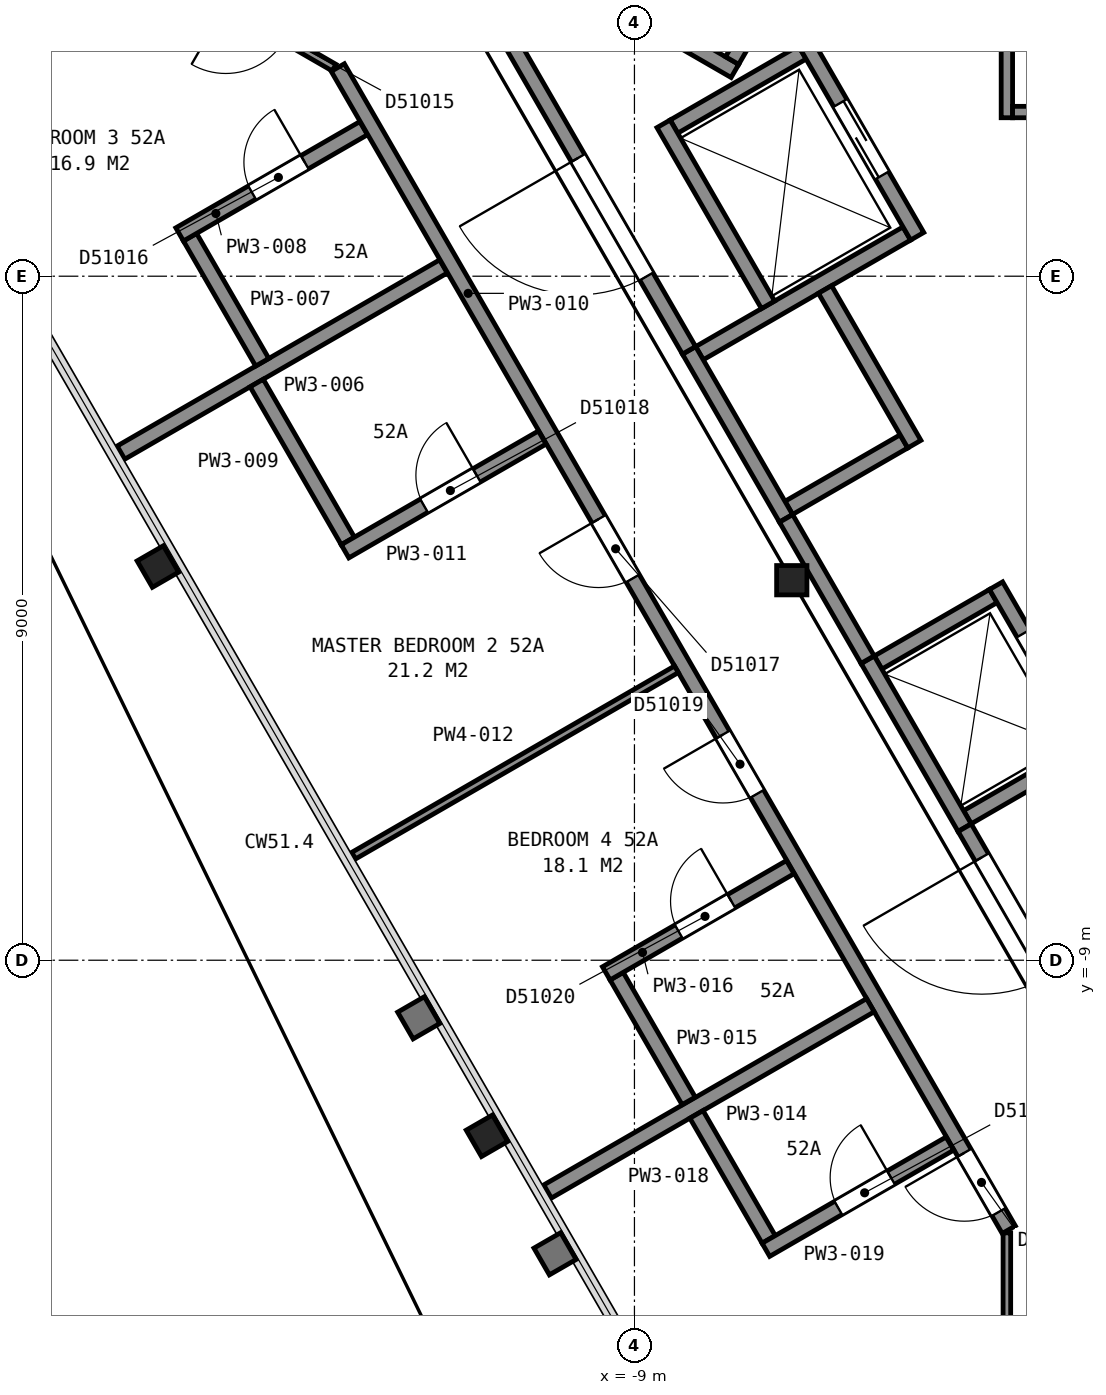
"""IFC4 building model, lengths in metres.
Left out: names, types, materials, properties, quantities, classifications, styles, units other than length and angle.
Written with IfcOpenShell. Run it as: python <this file> out.ifc"""

import sys

from ifc_helpers import new_model, si_unit, direction, frame, frame_2d, origin, origin_2d, place, context, subcontext, project, spatial, rectangle, i_section, extrude, element, fill, save


model = new_model("IFC4")
c1 = context("Model", 3, precision=1e-05, world=origin(), true_north=direction((0.0, 1.0)))
c2 = subcontext(c1, "Body", "Model", "MODEL_VIEW")
j1 = project(units=[si_unit("LENGTHUNIT", "METRE"), si_unit("PLANEANGLEUNIT", "RADIAN")], contexts=[c1])
p1 = place(None, origin())
s1 = spatial("IfcSite", under=j1, at=p1, CompositionType="ELEMENT")
p2 = place(p1, origin())
s2 = spatial("IfcBuilding", under=s1, at=p2, CompositionType="ELEMENT")
p3 = place(p2, frame((0.0, 0.0, 210.1)))
s3 = spatial("IfcBuildingStorey", under=s2, at=p3, CompositionType="ELEMENT", Elevation=210.1)
for number, where, z_axis, x_axis in (
    (1, (-15.27, -3.82, 0.0), (0.0, 0.0, 1.0), (-0.5, 0.866, 0.0)),
    (2, (-10.94, -11.31, 0.0), (0.0, 0.0, 1.0), (-0.5, 0.866, 0.0)),
):
    element("IfcColumn", number, at=place(p3, frame(where, z_axis=z_axis, x_axis=x_axis)), inside=s3, PredefinedType="COLUMN", context=c2, shape_type="SweptSolid", body=[
        extrude(i_section(OverallWidth=0.401, OverallDepth=0.399, WebThickness=0.025, FlangeThickness=0.04, FilletRadius=0.015, at=origin_2d()), origin(), (0.0, 0.0, 1.0), 3.665),
    ])
p4 = place(p3, frame((-6.93, -4.0, 0.0), z_axis=(0.0, 0.0, 1.0), x_axis=(1.0, 0.0, 0.0)))
e3 = element("IfcColumn", 3, at=p4, inside=s3, PredefinedType="COLUMN", context=c2, shape_type="SweptSolid", body=[
    extrude(i_section(OverallWidth=0.399, OverallDepth=0.386, WebThickness=0.021, FlangeThickness=0.033, FilletRadius=0.015, at=origin_2d()), origin(), (0.0, 0.0, 1.0), 3.7),
])
p5 = place(p3, frame((-7.678, 2.701, 0.0), z_axis=(0.0, 0.0, 1.0), x_axis=(-0.866019993635, 0.500009370536, 0.0)))
e4 = element("IfcWall", 4, at=p5, inside=s3, PredefinedType="PARTITIONING", context=c2, shape_type="SweptSolid", body=[
    extrude(rectangle(XDim=9.6, YDim=0.2, at=frame_2d((4.8, 0.0))), origin(), (0.0, 0.0, 1.0), 3.45),
])
p6 = place(p3, frame((-6.315, 5.262, 0.0), z_axis=(0.0, 0.0, 1.0), x_axis=(-0.500049511043, -0.865996816683, 0.0)))
e5 = element("IfcWall", 5, at=p6, inside=s3, PredefinedType="PARTITIONING", context=c2, shape_type="SweptSolid", body=[
    extrude(rectangle(XDim=2.8, YDim=0.2, at=frame_2d((1.4, 0.0))), origin(), (0.0, 0.0, 1.0), 3.45),
])
for number, where, z_axis, x_axis in (
    (6, (-4.62, -7.118, 0.0), (0.0, 0.0, 1.0), (0.866, 0.5, 0.0)),
    (7, (-5.795, -5.083, 0.0), (0.0, 0.0, 1.0), (0.866, 0.5, 0.0)),
    (8, (-6.97, -3.048, 0.0), (0.0, 0.0, 1.0), (0.866, 0.5, 0.0)),
):
    element("IfcWall", number, at=place(p3, frame(where, z_axis=z_axis, x_axis=x_axis)), inside=s3, PredefinedType="PARTITIONING", context=c2, shape_type="SweptSolid", body=[
        extrude(rectangle(XDim=1.75, YDim=0.2, at=frame_2d((0.875, 0.0))), origin(), (0.0, 0.0, 1.0), 3.7),
    ])
p7 = place(p3, frame((-8.145, -1.013, 0.0), z_axis=(0.0, 0.0, 1.0), x_axis=(0.866016494683, 0.500015430699, 0.0)))
e9 = element("IfcWall", 9, at=p7, inside=s3, PredefinedType="PARTITIONING", context=c2, shape_type="SweptSolid", body=[
    extrude(rectangle(XDim=3.15, YDim=0.2, at=frame_2d((1.575, 0.0))), origin(), (0.0, 0.0, 1.0), 3.7),
])
p8 = place(p3, frame((-8.48, 1.969, 0.0), z_axis=(0.0, 0.0, 1.0), x_axis=(0.866000020948, 0.500043961785, 0.0)))
e10 = element("IfcWall", 10, at=p8, inside=s3, PredefinedType="PARTITIONING", context=c2, shape_type="SweptSolid", body=[
    extrude(rectangle(XDim=1.95, YDim=0.2, at=frame_2d((0.975, 0.0))), origin(), (0.0, 0.0, 1.0), 3.7),
])
p9 = place(p3, frame((-5.28, 0.525, 0.0), z_axis=(0.0, 0.0, 1.0), x_axis=(-0.500037662692, 0.866003658127, 0.0)))
e11 = element("IfcWall", 11, at=p9, inside=s3, PredefinedType="PARTITIONING", context=c2, shape_type="SweptSolid", body=[
    extrude(rectangle(XDim=2.95, YDim=0.2, at=frame_2d((1.475, 0.0))), origin(), (0.0, 0.0, 1.0), 3.7),
])
p10 = place(p9, frame((0.925, 0.0, 0.0)))
e12 = element("IfcOpeningElement", 12, at=p10, cuts=e11, PredefinedType="OPENING", context=c2, shape_type="SweptSolid", body=[
    extrude(rectangle(XDim=1.1, YDim=2.1, at=frame_2d((0.55, 1.05))), frame((0.0, 0.11, 0.0), z_axis=(0.0, -1.0, 0.0), x_axis=(1.0, 0.0, 0.0)), (0.0, 0.0, 1.0), 0.22),
])
p11 = place(p3, frame((-2.968, -6.28, 0.0), z_axis=(0.0, 0.0, 1.0), x_axis=(-0.499990435942, 0.866030925526, 0.0)))
e13 = element("IfcWall", 13, at=p11, inside=s3, PredefinedType="PARTITIONING", context=c2, shape_type="SweptSolid", body=[
    extrude(rectangle(XDim=2.55, YDim=0.2, at=frame_2d((1.275, 0.0))), origin(), (0.0, 0.0, 1.0), 3.7),
])
p12 = place(p11, frame((0.725, 0.0, 0.0)))
e14 = element("IfcOpeningElement", 14, at=p12, cuts=e13, PredefinedType="OPENING", context=c2, shape_type="SweptSolid", body=[
    extrude(rectangle(XDim=1.1, YDim=2.1, at=frame_2d((0.55, 1.05))), frame((0.0, 0.11, 0.0), z_axis=(0.0, -1.0, 0.0), x_axis=(1.0, 0.0, 0.0)), (0.0, 0.0, 1.0), 0.22),
])
p13 = place(p3, frame((-5.318, -2.21, 0.0), z_axis=(0.0, 0.0, 1.0), x_axis=(-0.499938297808, 0.866061024631, 0.0)))
e15 = element("IfcWall", 15, at=p13, inside=s3, PredefinedType="PARTITIONING", context=c2, shape_type="SweptSolid", body=[
    extrude(rectangle(XDim=2.35, YDim=0.2, at=frame_2d((1.175, 0.0))), origin(), (0.0, 0.0, 1.0), 3.7),
])
p14 = place(p3, frame((-7.242, -0.376, 0.0), z_axis=(0.0, 0.0, 1.0), x_axis=(-0.499996545922, 0.866027397988, 0.0)))
e16 = element("IfcWall", 16, at=p14, inside=s3, PredefinedType="PARTITIONING", context=c2, shape_type="SweptSolid", body=[
    extrude(rectangle(XDim=2.75, YDim=0.2, at=frame_2d((1.375, 0.0))), origin(), (0.0, 0.0, 1.0), 3.7),
])
for number, where, z_axis, x_axis in (
    (17, (-4.656, -7.255, 0.0), (0.0, 0.0, 1.0), (-0.5, 0.866, 0.0)),
    (18, (-7.006, -3.185, 0.0), (0.0, 0.0, 1.0), (-0.5, 0.866, 0.0)),
):
    element("IfcWall", number, at=place(p3, frame(where, z_axis=z_axis, x_axis=x_axis)), inside=s3, PredefinedType="PARTITIONING", context=c2, shape_type="SweptSolid", body=[
        extrude(rectangle(XDim=2.55, YDim=0.2, at=frame_2d((1.275, 0.0))), origin(), (0.0, 0.0, 1.0), 3.7),
    ])
p15 = place(p3, frame((-11.591, 4.755, 0.0), z_axis=(0.0, 0.0, 1.0), x_axis=(0.500043977787, -0.866000011708, 0.0)))
e19 = element("IfcWall", 19, at=p15, inside=s3, PredefinedType="PARTITIONING", context=c2, shape_type="SweptSolid", body=[
    extrude(rectangle(XDim=6.617, YDim=0.2, at=frame_2d((3.308, 0.0))), origin(), (0.0, 0.0, 1.0), 3.45),
])
p16 = place(p15, frame((3.695, 0.0, 0.0)))
e20 = element("IfcOpeningElement", 20, at=p16, cuts=e19, PredefinedType="OPENING", context=c2, shape_type="SweptSolid", body=[
    extrude(rectangle(XDim=1.8, YDim=2.1, at=frame_2d((0.9, 1.05))), frame((0.0, 0.11, 0.0), z_axis=(0.0, -1.0, 0.0), x_axis=(1.0, 0.0, 0.0)), (0.0, 0.0, 1.0), 0.22),
])
p17 = place(p3, frame((-7.005, -3.187, 0.0), z_axis=(0.0, 0.0, 1.0), x_axis=(0.499689606989, -0.866204535123, 0.0)))
e21 = element("IfcWall", 21, at=p17, inside=s3, PredefinedType="PARTITIONING", context=c2, shape_type="SweptSolid", body=[
    extrude(rectangle(XDim=2.145, YDim=0.2, at=frame_2d((1.072, 0.0))), origin(), (0.0, 0.0, 1.0), 3.45),
])
p18 = place(p3, frame((-4.655, -7.257, 0.0), z_axis=(0.0, 0.0, 1.0), x_axis=(0.499966124405, -0.866044960985, 0.0)))
e22 = element("IfcWall", 22, at=p18, inside=s3, PredefinedType="PARTITIONING", context=c2, shape_type="SweptSolid", body=[
    extrude(rectangle(XDim=5.956, YDim=0.2, at=frame_2d((2.978, 0.0))), origin(), (0.0, 0.0, 1.0), 3.45),
])
p19 = place(p18, frame((0.45, 0.0, 0.0)))
e23 = element("IfcOpeningElement", 23, at=p19, cuts=e22, PredefinedType="OPENING", context=c2, shape_type="SweptSolid", body=[
    extrude(rectangle(XDim=1.8, YDim=2.1, at=frame_2d((0.9, 1.05))), frame((0.0, 0.11, 0.0), z_axis=(0.0, -1.0, 0.0), x_axis=(1.0, 0.0, 0.0)), (0.0, 0.0, 1.0), 0.22),
])
p20 = place(p3, frame((-4.1, 2.085, 0.0), z_axis=(0.0, 0.0, 1.0), x_axis=(0.0, 1.0, 0.0)))
e24 = element("IfcWall", 24, at=p20, inside=s3, PredefinedType="PARTITIONING", context=c2, shape_type="SweptSolid", body=[
    extrude(rectangle(XDim=3.523, YDim=0.15, at=frame_2d((1.761, 0.0))), origin(), (0.0, 0.0, 1.0), 3.45),
])
p21 = place(p3, frame((-4.025, 2.16, 0.0), z_axis=(0.0, 0.0, 1.0), x_axis=(1.0, 0.0, 0.0)))
e25 = element("IfcWall", 25, at=p21, inside=s3, PredefinedType="PARTITIONING", context=c2, shape_type="SweptSolid", body=[
    extrude(rectangle(XDim=1.238, YDim=0.15, at=frame_2d((0.619, 0.0))), origin(), (0.0, 0.0, 1.0), 3.45),
])
p22 = place(p3, frame((-12.952, 2.744, 0.0), z_axis=(0.0, 0.0, 1.0), x_axis=(-0.86608949446, 0.499888975259, 0.0)))
e26 = element("IfcWall", 26, at=p22, inside=s3, PredefinedType="PARTITIONING", context=c2, shape_type="SweptSolid", body=[
    extrude(rectangle(XDim=8.165, YDim=0.1, at=frame_2d((4.083, 0.0))), origin(), (0.0, 0.0, 1.0), 2.713),
])
p23 = place(p22, frame((4.65, 0.0, 0.0)))
e27 = element("IfcOpeningElement", 27, at=p23, cuts=e26, PredefinedType="OPENING", context=c2, shape_type="SweptSolid", body=[
    extrude(rectangle(XDim=0.9, YDim=2.1, at=frame_2d((0.45, 1.05))), frame((0.0, 0.06, 0.0), z_axis=(0.0, -1.0, 0.0), x_axis=(1.0, 0.0, 0.0)), (0.0, 0.0, 1.0), 0.12),
])
p24 = place(p22, frame((0.746, 0.0, 0.0)))
e28 = element("IfcOpeningElement", 28, at=p24, cuts=e26, PredefinedType="OPENING", context=c2, shape_type="SweptSolid", body=[
    extrude(rectangle(XDim=0.9, YDim=2.1, at=frame_2d((0.45, 1.05))), frame((0.0, 0.06, 0.0), z_axis=(0.0, -1.0, 0.0), x_axis=(1.0, 0.0, 0.0)), (0.0, 0.0, 1.0), 0.12),
])
p25 = place(p3, frame((-18.308, 2.099, 0.0), z_axis=(0.0, 0.0, 1.0), x_axis=(0.866054218355, 0.499950088379, 0.0)))
e29 = element("IfcWall", 29, at=p25, inside=s3, PredefinedType="PARTITIONING", context=c2, shape_type="SweptSolid", body=[
    extrude(rectangle(XDim=3.652, YDim=0.1, at=frame_2d((1.826, 0.0))), origin(), (0.0, 0.0, 1.0), 2.713),
])
p26 = place(p3, frame((-15.756, -2.321, 0.0), z_axis=(0.0, 0.0, 1.0), x_axis=(0.866042025588, 0.499971209087, 0.0)))
e30 = element("IfcWall", 30, at=p26, inside=s3, PredefinedType="PARTITIONING", context=c2, shape_type="SweptSolid", body=[
    extrude(rectangle(XDim=4.899, YDim=0.2, at=frame_2d((2.45, 0.0))), origin(), (0.0, 0.0, 1.0), 2.713),
])
p27 = place(p3, frame((-14.847, 0.513, 0.0), z_axis=(0.0, 0.0, 1.0), x_axis=(0.499911523785, -0.866076479525, 0.0)))
e31 = element("IfcWall", 31, at=p27, inside=s3, PredefinedType="PARTITIONING", context=c2, shape_type="SweptSolid", body=[
    extrude(rectangle(XDim=1.9, YDim=0.2, at=frame_2d((0.95, 0.0))), origin(), (0.0, 0.0, 1.0), 2.713),
])
p28 = place(p3, frame((-12.563, 1.948, 0.0), z_axis=(0.0, 0.0, 1.0), x_axis=(-0.866041588165, -0.499971966783, 0.0)))
e32 = element("IfcWall", 32, at=p28, inside=s3, PredefinedType="PARTITIONING", context=c2, shape_type="SweptSolid", body=[
    extrude(rectangle(XDim=2.795, YDim=0.2, at=frame_2d((1.397, 0.0))), origin(), (0.0, 0.0, 1.0), 2.713),
])
p29 = place(p28, frame((0.895, 0.0, 0.0)))
e33 = element("IfcOpeningElement", 33, at=p29, cuts=e32, PredefinedType="OPENING", context=c2, shape_type="SweptSolid", body=[
    extrude(rectangle(XDim=0.8, YDim=2.1, at=frame_2d((0.4, 1.05))), frame((0.0, 0.11, 0.0), z_axis=(0.0, -1.0, 0.0), x_axis=(1.0, 0.0, 0.0)), (0.0, 0.0, 1.0), 0.22),
])
p30 = place(p3, frame((-13.97, -1.406, 0.0), z_axis=(0.0, 0.0, 1.0), x_axis=(0.499784123135, -0.866150004481, 0.0)))
e34 = element("IfcWall", 34, at=p30, inside=s3, PredefinedType="PARTITIONING", context=c2, shape_type="SweptSolid", body=[
    extrude(rectangle(XDim=2.399, YDim=0.2, at=frame_2d((1.199, 0.0))), origin(), (0.0, 0.0, 1.0), 2.713),
])
p31 = place(p3, frame((-4.075, -12.545, 0.0), z_axis=(0.0, 0.0, 1.0), x_axis=(-0.499999743747, 0.866025551732, 0.0)))
e35 = element("IfcWall", 35, at=p31, inside=s3, PredefinedType="PARTITIONING", context=c2, shape_type="SweptSolid", body=[
    extrude(rectangle(XDim=17.656, YDim=0.2, at=frame_2d((8.828, 0.0))), origin(), (0.0, 0.0, 1.0), 2.713),
])
p32 = place(p31, frame((9.895, 0.0, 0.0)))
e36 = element("IfcOpeningElement", 36, at=p32, cuts=e35, PredefinedType="OPENING", context=c2, shape_type="SweptSolid", body=[
    extrude(rectangle(XDim=0.9, YDim=2.1, at=frame_2d((0.45, 1.05))), frame((0.0, 0.11, 0.0), z_axis=(0.0, -1.0, 0.0), x_axis=(1.0, 0.0, 0.0)), (0.0, 0.0, 1.0), 0.22),
])
p33 = place(p31, frame((6.622, 0.0, 0.0)))
e37 = element("IfcOpeningElement", 37, at=p33, cuts=e35, PredefinedType="OPENING", context=c2, shape_type="SweptSolid", body=[
    extrude(rectangle(XDim=0.9, YDim=2.1, at=frame_2d((0.45, 1.05))), frame((0.0, 0.11, 0.0), z_axis=(0.0, -1.0, 0.0), x_axis=(1.0, 0.0, 0.0)), (0.0, 0.0, 1.0), 0.22),
])
p34 = place(p31, frame((0.268, 0.0, 0.0)))
e38 = element("IfcOpeningElement", 38, at=p34, cuts=e35, PredefinedType="OPENING", context=c2, shape_type="SweptSolid", body=[
    extrude(rectangle(XDim=0.9, YDim=2.1, at=frame_2d((0.45, 1.05))), frame((0.0, 0.11, 0.0), z_axis=(0.0, -1.0, 0.0), x_axis=(1.0, 0.0, 0.0)), (0.0, 0.0, 1.0), 0.22),
])
p35 = place(p3, frame((-12.808, -3.62, 0.0), z_axis=(0.0, 0.0, 1.0), x_axis=(0.866134024916, 0.499811815469, 0.0)))
e39 = element("IfcWall", 39, at=p35, inside=s3, PredefinedType="PARTITIONING", context=c2, shape_type="SweptSolid", body=[
    extrude(rectangle(XDim=2.996, YDim=0.2, at=frame_2d((1.498, 0.0))), origin(), (0.0, 0.0, 1.0), 2.713),
])
p36 = place(p35, frame((1.2, 0.0, 0.0)))
e40 = element("IfcOpeningElement", 40, at=p36, cuts=e39, PredefinedType="OPENING", context=c2, shape_type="SweptSolid", body=[
    extrude(rectangle(XDim=0.8, YDim=2.1, at=frame_2d((0.4, 1.05))), frame((0.0, 0.11, 0.0), z_axis=(0.0, -1.0, 0.0), x_axis=(1.0, 0.0, 0.0)), (0.0, 0.0, 1.0), 0.22),
])
p37 = place(p3, frame((-12.694, -7.624, 0.0), z_axis=(0.0, 0.0, 1.0), x_axis=(0.865991567799, 0.500058601068, 0.0)))
e41 = element("IfcWall", 41, at=p37, inside=s3, PredefinedType="PARTITIONING", context=c2, shape_type="SweptSolid", body=[
    extrude(rectangle(XDim=4.904, YDim=0.1, at=frame_2d((2.452, 0.0))), origin(), (0.0, 0.0, 1.0), 2.713),
])
p38 = place(p3, frame((-10.143, -12.043, 0.0), z_axis=(0.0, 0.0, 1.0), x_axis=(0.866136679459, 0.49980721533, 0.0)))
e42 = element("IfcWall", 42, at=p38, inside=s3, PredefinedType="PARTITIONING", context=c2, shape_type="SweptSolid", body=[
    extrude(rectangle(XDim=4.904, YDim=0.2, at=frame_2d((2.452, 0.0))), origin(), (0.0, 0.0, 1.0), 2.713),
])
p39 = place(p3, frame((-9.234, -9.21, 0.0), z_axis=(0.0, 0.0, 1.0), x_axis=(0.499949193323, -0.866054735046, 0.0)))
e43 = element("IfcWall", 43, at=p39, inside=s3, PredefinedType="PARTITIONING", context=c2, shape_type="SweptSolid", body=[
    extrude(rectangle(XDim=1.895, YDim=0.2, at=frame_2d((0.948, 0.0))), origin(), (0.0, 0.0, 1.0), 2.713),
])
p40 = place(p3, frame((-6.95, -7.775, 0.0), z_axis=(0.0, 0.0, 1.0), x_axis=(-0.866003766563, -0.500037474894, 0.0)))
e44 = element("IfcWall", 44, at=p40, inside=s3, PredefinedType="PARTITIONING", context=c2, shape_type="SweptSolid", body=[
    extrude(rectangle(XDim=2.795, YDim=0.2, at=frame_2d((1.397, 0.0))), origin(), (0.0, 0.0, 1.0), 2.713),
])
p41 = place(p40, frame((0.895, 0.0, 0.0)))
e45 = element("IfcOpeningElement", 45, at=p41, cuts=e44, PredefinedType="OPENING", context=c2, shape_type="SweptSolid", body=[
    extrude(rectangle(XDim=0.8, YDim=2.1, at=frame_2d((0.4, 1.05))), frame((0.0, 0.11, 0.0), z_axis=(0.0, -1.0, 0.0), x_axis=(1.0, 0.0, 0.0)), (0.0, 0.0, 1.0), 0.22),
])
p42 = place(p3, frame((-8.184, -11.029, 0.0), z_axis=(0.0, 0.0, 1.0), x_axis=(0.500134112126, -0.865947960265, 0.0)))
e46 = element("IfcWall", 46, at=p42, inside=s3, PredefinedType="PARTITIONING", context=c2, shape_type="SweptSolid", body=[
    extrude(rectangle(XDim=1.899, YDim=0.2, at=frame_2d((0.95, 0.0))), origin(), (0.0, 0.0, 1.0), 2.713),
])
p43 = place(p3, frame((-7.271, -12.81, 0.0), z_axis=(0.0, 0.0, 1.0), x_axis=(0.866041588165, 0.499971966783, 0.0)))
e47 = element("IfcWall", 47, at=p43, inside=s3, PredefinedType="PARTITIONING", context=c2, shape_type="SweptSolid", body=[
    extrude(rectangle(XDim=2.795, YDim=0.2, at=frame_2d((1.397, 0.0))), origin(), (0.0, 0.0, 1.0), 2.713),
])
p44 = place(p43, frame((1.1, 0.0, 0.0)))
e48 = element("IfcOpeningElement", 48, at=p44, cuts=e47, PredefinedType="OPENING", context=c2, shape_type="SweptSolid", body=[
    extrude(rectangle(XDim=0.8, YDim=2.1, at=frame_2d((0.4, 1.05))), frame((0.0, 0.11, 0.0), z_axis=(0.0, -1.0, 0.0), x_axis=(1.0, 0.0, 0.0)), (0.0, 0.0, 1.0), 0.22),
])
p45 = place(p3, frame((-4.1, -20.65, 0.0), z_axis=(0.0, 0.0, 1.0), x_axis=(0.0, 1.0, 0.0)))
e49 = element("IfcWall", 49, at=p45, inside=s3, PredefinedType="PARTITIONING", context=c2, shape_type="SweptSolid", body=[
    extrude(rectangle(XDim=8.063, YDim=0.1, at=frame_2d((4.031, 0.0))), origin(), (0.0, 0.0, 1.0), 2.713),
])
p46 = place(p12, origin())
e50 = element("IfcDoor", 50, at=p46, inside=s3, OperationType="SLIDING_TO_RIGHT", PredefinedType="DOOR", context=c2, shape_type="SweptSolid", body=[
    extrude(rectangle(XDim=1.1, YDim=2.1, at=frame_2d((0.55, 1.05))), frame((0.0, 0.025, 0.0), z_axis=(0.0, -1.0, 0.0), x_axis=(1.0, 0.0, 0.0)), (0.0, 0.0, 1.0), 0.05),
])
fill(e14, e50)
p47 = place(p10, origin())
e51 = element("IfcDoor", 51, at=p47, inside=s3, OperationType="SLIDING_TO_LEFT", PredefinedType="DOOR", context=c2, shape_type="SweptSolid", body=[
    extrude(rectangle(XDim=1.1, YDim=2.1, at=frame_2d((0.55, 1.05))), frame((0.0, 0.025, 0.0), z_axis=(0.0, -1.0, 0.0), x_axis=(1.0, 0.0, 0.0)), (0.0, 0.0, 1.0), 0.05),
])
fill(e12, e51)
p48 = place(p16, origin())
e52 = element("IfcDoor", 52, at=p48, inside=s3, OperationType="DOUBLE_DOOR_SINGLE_SWING", PredefinedType="DOOR", context=c2, shape_type="SweptSolid", body=[
    extrude(rectangle(XDim=1.8, YDim=2.1, at=frame_2d((0.9, 1.05))), frame((0.0, 0.025, 0.0), z_axis=(0.0, -1.0, 0.0), x_axis=(1.0, 0.0, 0.0)), (0.0, 0.0, 1.0), 0.05),
])
fill(e20, e52)
p49 = place(p19, origin())
e53 = element("IfcDoor", 53, at=p49, inside=s3, OperationType="DOUBLE_DOOR_SINGLE_SWING", PredefinedType="DOOR", context=c2, shape_type="SweptSolid", body=[
    extrude(rectangle(XDim=1.8, YDim=2.1, at=frame_2d((0.9, 1.05))), frame((0.0, 0.025, 0.0), z_axis=(0.0, -1.0, 0.0), x_axis=(1.0, 0.0, 0.0)), (0.0, 0.0, 1.0), 0.05),
])
fill(e23, e53)
p50 = place(p29, origin())
e54 = element("IfcDoor", 54, at=p50, inside=s3, OperationType="SINGLE_SWING_LEFT", PredefinedType="DOOR", context=c2, shape_type="SweptSolid", body=[
    extrude(rectangle(XDim=0.8, YDim=2.1, at=frame_2d((0.4, 1.05))), frame((0.0, 0.025, 0.0), z_axis=(0.0, -1.0, 0.0), x_axis=(1.0, 0.0, 0.0)), (0.0, 0.0, 1.0), 0.05),
])
fill(e33, e54)
p51 = place(p32, origin())
e55 = element("IfcDoor", 55, at=p51, inside=s3, OperationType="SINGLE_SWING_RIGHT", PredefinedType="DOOR", context=c2, shape_type="SweptSolid", body=[
    extrude(rectangle(XDim=0.9, YDim=2.1, at=frame_2d((0.45, 1.05))), frame((0.0, 0.025, 0.0), z_axis=(0.0, -1.0, 0.0), x_axis=(1.0, 0.0, 0.0)), (0.0, 0.0, 1.0), 0.05),
])
fill(e36, e55)
p52 = place(p33, origin())
e56 = element("IfcDoor", 56, at=p52, inside=s3, OperationType="SINGLE_SWING_RIGHT", PredefinedType="DOOR", context=c2, shape_type="SweptSolid", body=[
    extrude(rectangle(XDim=0.9, YDim=2.1, at=frame_2d((0.45, 1.05))), frame((0.0, 0.025, 0.0), z_axis=(0.0, -1.0, 0.0), x_axis=(1.0, 0.0, 0.0)), (0.0, 0.0, 1.0), 0.05),
])
fill(e37, e56)
p53 = place(p34, origin())
e57 = element("IfcDoor", 57, at=p53, inside=s3, OperationType="SINGLE_SWING_RIGHT", PredefinedType="DOOR", context=c2, shape_type="SweptSolid", body=[
    extrude(rectangle(XDim=0.9, YDim=2.1, at=frame_2d((0.45, 1.05))), frame((0.0, 0.025, 0.0), z_axis=(0.0, -1.0, 0.0), x_axis=(1.0, 0.0, 0.0)), (0.0, 0.0, 1.0), 0.05),
])
fill(e38, e57)
p54 = place(p36, origin())
e58 = element("IfcDoor", 58, at=p54, inside=s3, OperationType="SINGLE_SWING_RIGHT", PredefinedType="DOOR", context=c2, shape_type="SweptSolid", body=[
    extrude(rectangle(XDim=0.8, YDim=2.1, at=frame_2d((0.4, 1.05))), frame((0.0, 0.025, 0.0), z_axis=(0.0, -1.0, 0.0), x_axis=(1.0, 0.0, 0.0)), (0.0, 0.0, 1.0), 0.05),
])
fill(e40, e58)
p55 = place(p41, origin())
e59 = element("IfcDoor", 59, at=p55, inside=s3, OperationType="SINGLE_SWING_LEFT", PredefinedType="DOOR", context=c2, shape_type="SweptSolid", body=[
    extrude(rectangle(XDim=0.8, YDim=2.1, at=frame_2d((0.4, 1.05))), frame((0.0, 0.025, 0.0), z_axis=(0.0, -1.0, 0.0), x_axis=(1.0, 0.0, 0.0)), (0.0, 0.0, 1.0), 0.05),
])
fill(e45, e59)
p56 = place(p44, origin())
e60 = element("IfcDoor", 60, at=p56, inside=s3, OperationType="SINGLE_SWING_RIGHT", PredefinedType="DOOR", context=c2, shape_type="SweptSolid", body=[
    extrude(rectangle(XDim=0.8, YDim=2.1, at=frame_2d((0.4, 1.05))), frame((0.0, 0.025, 0.0), z_axis=(0.0, -1.0, 0.0), x_axis=(1.0, 0.0, 0.0)), (0.0, 0.0, 1.0), 0.05),
])
fill(e48, e60)
save(model, sys.argv[1])
